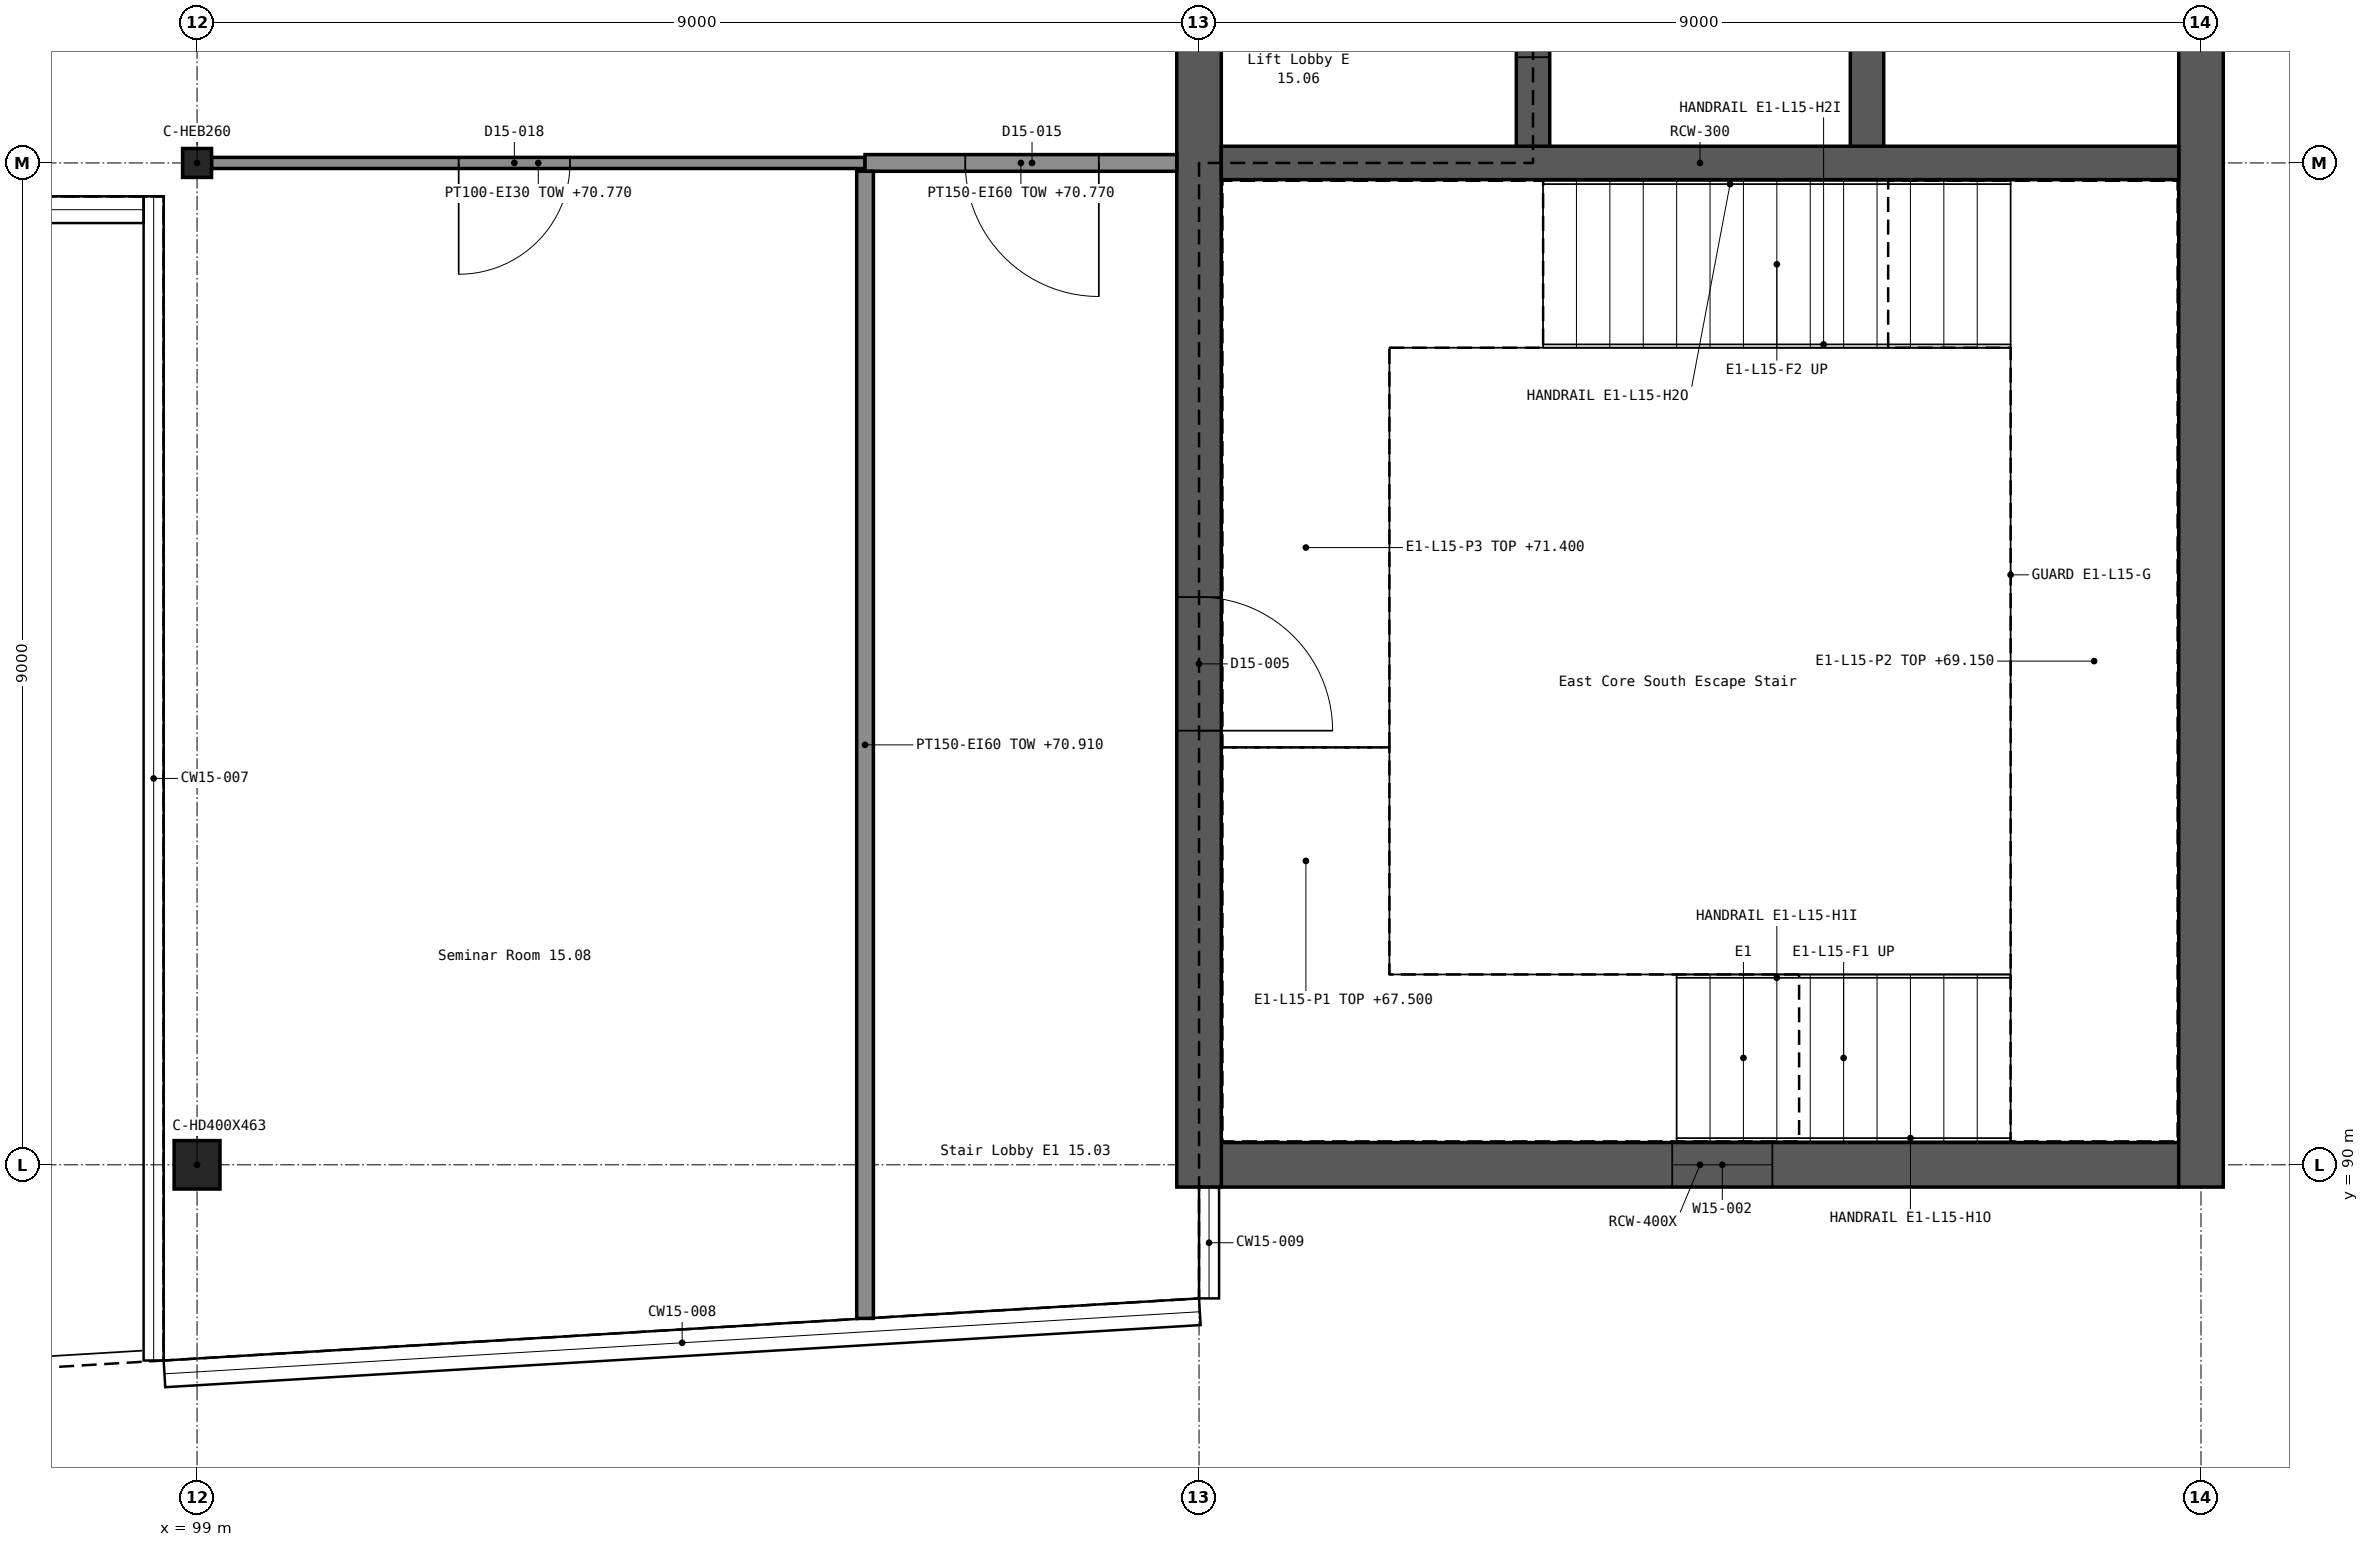
"""IFC4 building model, lengths in metres.
Left out: names, types, materials, properties, quantities, classifications, styles, units other than length and angle.
Written with IfcOpenShell. Run it as: python <this file> out.ifc"""

import sys

from ifc_helpers import new_model, si_unit, direction, frame, frame_2d, origin, origin_2d, place, context, subcontext, project, spatial, rectangle, i_section, extrude, element, fill, save


model = new_model("IFC4")
c1 = context("Model", 3, precision=1e-05, world=origin(), true_north=direction((0.0, 1.0)))
c2 = subcontext(c1, "Body", "Model", "MODEL_VIEW")
j1 = project(units=[si_unit("LENGTHUNIT", "METRE"), si_unit("PLANEANGLEUNIT", "RADIAN")], contexts=[c1])
p1 = place(None, origin())
s1 = spatial("IfcSite", under=j1, at=p1, CompositionType="ELEMENT")
p2 = place(p1, origin())
s2 = spatial("IfcBuilding", under=s1, at=p2, CompositionType="ELEMENT")
p3 = place(p2, frame((0.0, 0.0, 67.5)))
s3 = spatial("IfcBuildingStorey", under=s2, at=p3, CompositionType="ELEMENT", Elevation=67.5)
p4 = place(p3, frame((108.2, 90.0, 0.0), z_axis=(0.0, 0.0, 1.0), x_axis=(1.0, 0.0, 0.0)))
e1 = element("IfcWall", 1, at=p4, inside=s3, PredefinedType="SHEAR", context=c2, shape_type="SweptSolid", body=[
    extrude(rectangle(XDim=8.6, YDim=0.4, at=frame_2d((4.3, 0.0))), origin(), (0.0, 0.0, 1.0), 3.9),
])
p5 = place(p4, frame((4.05, 0.0, 1.2)))
e2 = element("IfcOpeningElement", 2, at=p5, cuts=e1, PredefinedType="OPENING", context=c2, shape_type="SweptSolid", body=[
    extrude(rectangle(XDim=0.9, YDim=1.5, at=frame_2d((0.45, 0.75))), frame((0.0, 0.211, 0.0), z_axis=(0.0, -1.0, 0.0), x_axis=(1.0, 0.0, 0.0)), (0.0, 0.0, 1.0), 0.422),
])
p6 = place(p3, frame((108.0, 89.8, 0.0), z_axis=(0.0, 0.0, 1.0), x_axis=(0.0, 1.0, 0.0)))
e3 = element("IfcWall", 3, at=p6, inside=s3, PredefinedType="SHEAR", context=c2, shape_type="SweptSolid", body=[
    extrude(rectangle(XDim=27.4, YDim=0.4, at=frame_2d((13.7, 0.0))), origin(), (0.0, 0.0, 1.0), 3.9),
])
p7 = place(p6, frame((4.1, 0.0, 0.0)))
e4 = element("IfcOpeningElement", 4, at=p7, cuts=e3, PredefinedType="OPENING", context=c2, shape_type="SweptSolid", body=[
    extrude(rectangle(XDim=1.2, YDim=2.1, at=frame_2d((0.6, 1.05))), frame((0.0, 0.211, 0.0), z_axis=(0.0, -1.0, 0.0), x_axis=(1.0, 0.0, 0.0)), (0.0, 0.0, 1.0), 0.422),
])
p8 = place(p6, frame((22.1, 0.0, 0.0)))
e5 = element("IfcOpeningElement", 5, at=p8, cuts=e3, PredefinedType="OPENING", context=c2, shape_type="SweptSolid", body=[
    extrude(rectangle(XDim=1.2, YDim=2.1, at=frame_2d((0.6, 1.05))), frame((0.0, 0.211, 0.0), z_axis=(0.0, -1.0, 0.0), x_axis=(1.0, 0.0, 0.0)), (0.0, 0.0, 1.0), 0.422),
])
p9 = place(p6, frame((12.5, 0.0, 0.0)))
e6 = element("IfcOpeningElement", 6, at=p9, cuts=e3, PredefinedType="OPENING", context=c2, shape_type="SweptSolid", body=[
    extrude(rectangle(XDim=2.0, YDim=2.1, at=frame_2d((1.0, 1.05))), frame((0.0, 0.211, 0.0), z_axis=(0.0, -1.0, 0.0), x_axis=(1.0, 0.0, 0.0)), (0.0, 0.0, 1.0), 0.422),
])
p10 = place(p3, frame((117.0, 89.8, 0.0), z_axis=(0.0, 0.0, 1.0), x_axis=(0.0, 1.0, 0.0)))
e7 = element("IfcWall", 7, at=p10, inside=s3, PredefinedType="SHEAR", context=c2, shape_type="SweptSolid", body=[
    extrude(rectangle(XDim=27.4, YDim=0.4, at=frame_2d((13.7, 0.0))), origin(), (0.0, 0.0, 1.0), 3.9),
])
p11 = place(p3, frame((108.2, 99.0, 0.0), z_axis=(0.0, 0.0, 1.0), x_axis=(1.0, 0.0, 0.0)))
e8 = element("IfcWall", 8, at=p11, inside=s3, PredefinedType="SHEAR", context=c2, shape_type="SweptSolid", body=[
    extrude(rectangle(XDim=8.6, YDim=0.3, at=frame_2d((4.3, 0.0))), origin(), (0.0, 0.0, 1.0), 3.9),
])
p12 = place(p3, frame((111.0, 99.15, 0.0), z_axis=(0.0, 0.0, 1.0), x_axis=(0.0, 1.0, 0.0)))
e9 = element("IfcWall", 9, at=p12, inside=s3, PredefinedType="SHEAR", context=c2, shape_type="SweptSolid", body=[
    extrude(rectangle(XDim=8.7, YDim=0.3, at=frame_2d((4.35, 0.0))), origin(), (0.0, 0.0, 1.0), 3.9),
])
p13 = place(p12, frame((0.8, 0.0, 0.0)))
e10 = element("IfcOpeningElement", 10, at=p13, cuts=e9, PredefinedType="OPENING", context=c2, shape_type="SweptSolid", body=[
    extrude(rectangle(XDim=1.1, YDim=2.1, at=frame_2d((0.55, 1.05))), frame((0.0, 0.161, 0.0), z_axis=(0.0, -1.0, 0.0), x_axis=(1.0, 0.0, 0.0)), (0.0, 0.0, 1.0), 0.322),
])
p14 = place(p12, frame((3.8, 0.0, 0.0)))
e11 = element("IfcOpeningElement", 11, at=p14, cuts=e9, PredefinedType="OPENING", context=c2, shape_type="SweptSolid", body=[
    extrude(rectangle(XDim=1.1, YDim=2.1, at=frame_2d((0.55, 1.05))), frame((0.0, 0.161, 0.0), z_axis=(0.0, -1.0, 0.0), x_axis=(1.0, 0.0, 0.0)), (0.0, 0.0, 1.0), 0.322),
])
p15 = place(p12, frame((6.8, 0.0, 0.0)))
e12 = element("IfcOpeningElement", 12, at=p15, cuts=e9, PredefinedType="OPENING", context=c2, shape_type="SweptSolid", body=[
    extrude(rectangle(XDim=1.1, YDim=2.1, at=frame_2d((0.55, 1.05))), frame((0.0, 0.161, 0.0), z_axis=(0.0, -1.0, 0.0), x_axis=(1.0, 0.0, 0.0)), (0.0, 0.0, 1.0), 0.322),
])
p16 = place(p3, frame((114.0, 99.15, 0.0), z_axis=(0.0, 0.0, 1.0), x_axis=(0.0, 1.0, 0.0)))
e13 = element("IfcWall", 13, at=p16, inside=s3, PredefinedType="SHEAR", context=c2, shape_type="SweptSolid", body=[
    extrude(rectangle(XDim=8.7, YDim=0.3, at=frame_2d((4.35, 0.0))), origin(), (0.0, 0.0, 1.0), 3.9),
])
p17 = place(p3, frame((99.0, 90.0, 0.0), z_axis=(0.0, 0.0, 1.0), x_axis=(1.0, 0.0, 0.0)))
e14 = element("IfcColumn", 14, at=p17, inside=s3, PredefinedType="COLUMN", context=c2, shape_type="SweptSolid", body=[
    extrude(i_section(OverallWidth=0.412, OverallDepth=0.435, WebThickness=0.036, FlangeThickness=0.057, FilletRadius=0.015, at=origin_2d()), origin(), (0.0, 0.0, 1.0), 3.9),
])
p18 = place(p3, frame((99.0, 99.0, 0.0), z_axis=(0.0, 0.0, 1.0), x_axis=(1.0, 0.0, 0.0)))
e15 = element("IfcColumn", 15, at=p18, inside=s3, PredefinedType="COLUMN", context=c2, shape_type="SweptSolid", body=[
    extrude(i_section(OverallWidth=0.26, OverallDepth=0.26, WebThickness=0.01, FlangeThickness=0.018, FilletRadius=0.024, at=origin_2d()), origin(), (0.0, 0.0, 1.0), 3.9),
])
p19 = place(p3, frame((99.13, 99.0, 0.0), z_axis=(0.0, 0.0, 1.0), x_axis=(1.0, 0.0, 0.0)))
e16 = element("IfcWall", 16, at=p19, inside=s3, PredefinedType="PARTITIONING", context=c2, shape_type="SweptSolid", body=[
    extrude(rectangle(XDim=5.87, YDim=0.1, at=frame_2d((2.935, 0.0))), origin(), (0.0, 0.0, 1.0), 3.27),
])
p20 = place(p19, frame((2.22, 0.0, 0.0)))
e17 = element("IfcOpeningElement", 17, at=p20, cuts=e16, PredefinedType="OPENING", context=c2, shape_type="SweptSolid", body=[
    extrude(rectangle(XDim=1.0, YDim=2.1, at=frame_2d((0.5, 1.05))), frame((0.0, 0.061, 0.0), z_axis=(0.0, -1.0, 0.0), x_axis=(1.0, 0.0, 0.0)), (0.0, 0.0, 1.0), 0.122),
])
p21 = place(p3, frame((105.0, 99.0, 0.0), z_axis=(0.0, 0.0, 1.0), x_axis=(1.0, 0.0, 0.0)))
e18 = element("IfcWall", 18, at=p21, inside=s3, PredefinedType="PARTITIONING", context=c2, shape_type="SweptSolid", body=[
    extrude(rectangle(XDim=2.8, YDim=0.15, at=frame_2d((1.4, 0.0))), origin(), (0.0, 0.0, 1.0), 3.27),
])
p22 = place(p21, frame((0.9, 0.0, 0.0)))
e19 = element("IfcOpeningElement", 19, at=p22, cuts=e18, PredefinedType="OPENING", context=c2, shape_type="SweptSolid", body=[
    extrude(rectangle(XDim=1.2, YDim=2.1, at=frame_2d((0.6, 1.05))), frame((0.0, 0.086, 0.0), z_axis=(0.0, -1.0, 0.0), x_axis=(1.0, 0.0, 0.0)), (0.0, 0.0, 1.0), 0.172),
])
p23 = place(p3, frame((105.0, 88.62, 0.0), z_axis=(0.0, 0.0, 1.0), x_axis=(0.0, 1.0, 0.0)))
e20 = element("IfcWall", 20, at=p23, inside=s3, PredefinedType="PARTITIONING", context=c2, shape_type="SweptSolid", body=[
    extrude(rectangle(XDim=10.305, YDim=0.15, at=frame_2d((5.152, 0.0))), origin(), (0.0, 0.0, 1.0), 3.41),
])
p24 = place(p5, origin())
e21 = element("IfcWindow", 21, at=p24, inside=s3, PartitioningType="SINGLE_PANEL", PredefinedType="WINDOW", context=c2, shape_type="SweptSolid", body=[
    extrude(rectangle(XDim=0.9, YDim=1.5, at=frame_2d((0.45, 0.75))), frame((0.0, 0.03, 0.0), z_axis=(0.0, -1.0, 0.0), x_axis=(1.0, 0.0, 0.0)), (0.0, 0.0, 1.0), 0.06),
])
fill(e2, e21)
p25 = place(p7, frame((1.2, 0.0, 0.0), z_axis=(0.0, 0.0, 1.0), x_axis=(-1.0, 0.0, 0.0)))
e22 = element("IfcDoor", 22, at=p25, inside=s3, OperationType="SINGLE_SWING_RIGHT", PredefinedType="DOOR", context=c2, shape_type="SweptSolid", body=[
    extrude(rectangle(XDim=1.2, YDim=2.1, at=frame_2d((0.6, 1.05))), frame((0.0, 0.025, 0.0), z_axis=(0.0, -1.0, 0.0), x_axis=(1.0, 0.0, 0.0)), (0.0, 0.0, 1.0), 0.05),
])
fill(e4, e22)
p26 = place(p13, origin())
e23 = element("IfcDoor", 23, at=p26, inside=s3, OperationType="DOUBLE_DOOR_SLIDING", PredefinedType="DOOR", context=c2, shape_type="SweptSolid", body=[
    extrude(rectangle(XDim=1.1, YDim=2.1, at=frame_2d((0.55, 1.05))), frame((0.0, 0.025, 0.0), z_axis=(0.0, -1.0, 0.0), x_axis=(1.0, 0.0, 0.0)), (0.0, 0.0, 1.0), 0.05),
])
fill(e10, e23)
p27 = place(p22, frame((1.2, 0.0, 0.0), z_axis=(0.0, 0.0, 1.0), x_axis=(-1.0, 0.0, 0.0)))
e24 = element("IfcDoor", 24, at=p27, inside=s3, OperationType="SINGLE_SWING_LEFT", PredefinedType="DOOR", context=c2, shape_type="SweptSolid", body=[
    extrude(rectangle(XDim=1.2, YDim=2.1, at=frame_2d((0.6, 1.05))), frame((0.0, 0.025, 0.0), z_axis=(0.0, -1.0, 0.0), x_axis=(1.0, 0.0, 0.0)), (0.0, 0.0, 1.0), 0.05),
])
fill(e19, e24)
p28 = place(p20, frame((1.0, 0.0, 0.0), z_axis=(0.0, 0.0, 1.0), x_axis=(-1.0, 0.0, 0.0)))
e25 = element("IfcDoor", 25, at=p28, inside=s3, OperationType="SINGLE_SWING_RIGHT", PredefinedType="DOOR", context=c2, shape_type="SweptSolid", body=[
    extrude(rectangle(XDim=1.0, YDim=2.1, at=frame_2d((0.5, 1.05))), frame((0.0, 0.025, 0.0), z_axis=(0.0, -1.0, 0.0), x_axis=(1.0, 0.0, 0.0)), (0.0, 0.0, 1.0), 0.05),
])
fill(e17, e25)
save(model, sys.argv[1])
